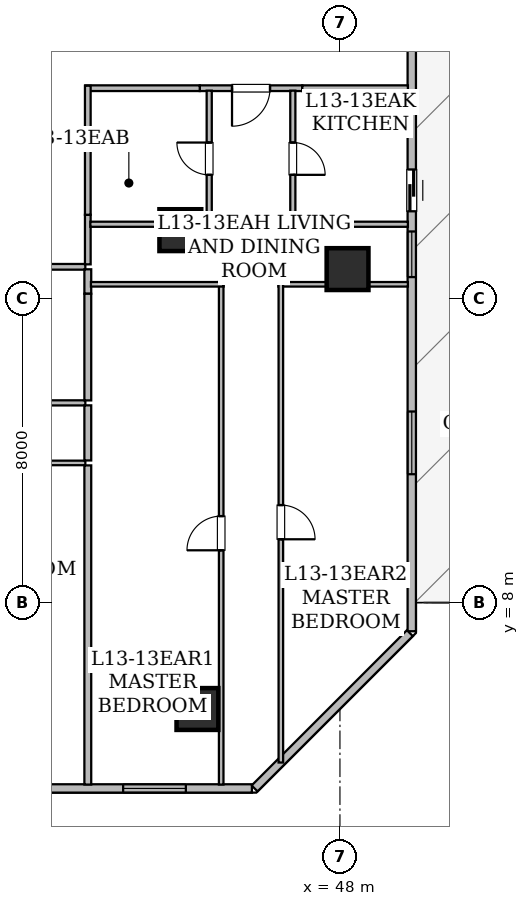
"""IFC4 building model, lengths in metres.
Left out: names, types, materials, properties, quantities, classifications, styles, units other than length and angle.
Written with IfcOpenShell. Run it as: python <this file> out.ifc"""

import sys

from ifc_helpers import new_model, si_unit, direction, frame, frame_2d, origin, origin_2d, place, context, subcontext, project, spatial, rectangle, hollow_rectangle, extrude, element, fill, save


model = new_model("IFC4")
c1 = context("Model", 3, precision=1e-05, world=origin(), true_north=direction((0.0, 1.0)))
c2 = subcontext(c1, "Body", "Model", "MODEL_VIEW")
j1 = project(units=[si_unit("LENGTHUNIT", "METRE"), si_unit("PLANEANGLEUNIT", "RADIAN")], contexts=[c1])
p1 = place(None, origin())
s1 = spatial("IfcSite", under=j1, at=p1, CompositionType="ELEMENT")
p2 = place(p1, origin())
s2 = spatial("IfcBuilding", under=s1, at=p2, CompositionType="ELEMENT")
p3 = place(p2, frame((0.0, 0.0, 55.2)))
s3 = spatial("IfcBuildingStorey", under=s2, at=p3, CompositionType="ELEMENT", Elevation=55.2)
for number, where, z_axis, x_axis in (
    (1, (44.25, 5.2, 0.0), (0.0, 0.0, 1.0), (1.0, 0.0, 0.0)),
    (2, (48.2, 16.775, 0.0), (0.0, 0.0, 1.0), (1.0, 0.0, 0.0)),
    (3, (43.8, 17.8, 0.0), (0.0, 0.0, 1.0), (1.0, 0.0, 0.0)),
):
    element("IfcColumn", number, at=place(p3, frame(where, z_axis=z_axis, x_axis=x_axis)), inside=s3, PredefinedType="COLUMN", context=c2, shape_type="SweptSolid", body=[
        extrude(hollow_rectangle(XDim=1.1, YDim=1.1, WallThickness=0.055, at=origin_2d()), origin(), (0.0, 0.0, 1.0), 3.65),
    ])
p4 = place(p3, frame((49.89, 24.707, 0.0), z_axis=(0.0, 0.0, 1.0), x_axis=(0.0, -1.0, 0.0)))
e4 = element("IfcWall", 4, at=p4, inside=s3, PredefinedType="STANDARD", context=c2, shape_type="SweptSolid", body=[
    extrude(rectangle(XDim=17.461, YDim=0.22, at=frame_2d((8.73, 0.0))), origin(), (0.0, 0.0, 1.0), 3.43),
])
p5 = place(p4, frame((5.311, 0.0, 0.0)))
e5 = element("IfcOpeningElement", 5, at=p5, cuts=e4, PredefinedType="OPENING", context=c2, shape_type="SweptSolid", body=[
    extrude(rectangle(XDim=1.1, YDim=2.2, at=frame_2d((0.55, 1.1))), frame((0.0, 0.12, 0.0), z_axis=(0.0, -1.0, 0.0), x_axis=(1.0, 0.0, 0.0)), (0.0, 0.0, 1.0), 0.24),
])
p6 = place(p4, frame((6.942, 0.0, 0.8)))
e6 = element("IfcOpeningElement", 6, at=p6, cuts=e4, PredefinedType="OPENING", context=c2, shape_type="SweptSolid", body=[
    extrude(rectangle(XDim=1.2, YDim=1.5, at=frame_2d((0.6, 0.75))), frame((0.0, 0.12, 0.0), z_axis=(0.0, -1.0, 0.0), x_axis=(1.0, 0.0, 0.0)), (0.0, 0.0, 1.0), 0.24),
])
p7 = place(p4, frame((11.679, 0.0, 0.85)))
e7 = element("IfcOpeningElement", 7, at=p7, cuts=e4, PredefinedType="OPENING", context=c2, shape_type="SweptSolid", body=[
    extrude(rectangle(XDim=1.65, YDim=1.55, at=frame_2d((0.825, 0.775))), frame((0.0, 0.12, 0.0), z_axis=(0.0, -1.0, 0.0), x_axis=(1.0, 0.0, 0.0)), (0.0, 0.0, 1.0), 0.24),
])
p8 = place(p3, frame((49.84, 7.196, 0.0), z_axis=(0.0, 0.0, 1.0), x_axis=(-0.707127905562, -0.70708565618, 0.0)))
e8 = element("IfcWall", 8, at=p8, inside=s3, PredefinedType="STANDARD", context=c2, shape_type="SweptSolid", body=[
    extrude(rectangle(XDim=5.779, YDim=0.22, at=frame_2d((2.889, 0.0))), origin(), (0.0, 0.0, 1.0), 3.43),
])
p9 = place(p3, frame((45.683, 3.11, 0.0), z_axis=(0.0, 0.0, 1.0), x_axis=(-1.0, 0.0, 0.0)))
e9 = element("IfcWall", 9, at=p9, inside=s3, PredefinedType="STANDARD", context=c2, shape_type="SweptSolid", body=[
    extrude(rectangle(XDim=37.368, YDim=0.22, at=frame_2d((18.684, 0.0))), origin(), (0.0, 0.0, 1.0), 3.43),
])
p10 = place(p9, frame((31.194, 0.0, 0.85)))
e10 = element("IfcOpeningElement", 10, at=p10, cuts=e9, PredefinedType="OPENING", context=c2, shape_type="SweptSolid", body=[
    extrude(rectangle(XDim=1.65, YDim=1.55, at=frame_2d((0.825, 0.775))), frame((0.0, 0.12, 0.0), z_axis=(0.0, -1.0, 0.0), x_axis=(1.0, 0.0, 0.0)), (0.0, 0.0, 1.0), 0.24),
])
p11 = place(p9, frame((19.615, 0.0, 0.85)))
e11 = element("IfcOpeningElement", 11, at=p11, cuts=e9, PredefinedType="OPENING", context=c2, shape_type="SweptSolid", body=[
    extrude(rectangle(XDim=1.65, YDim=1.55, at=frame_2d((0.825, 0.775))), frame((0.0, 0.12, 0.0), z_axis=(0.0, -1.0, 0.0), x_axis=(1.0, 0.0, 0.0)), (0.0, 0.0, 1.0), 0.24),
])
p12 = place(p9, frame((22.223, 0.0, 0.8)))
e12 = element("IfcOpeningElement", 12, at=p12, cuts=e9, PredefinedType="OPENING", context=c2, shape_type="SweptSolid", body=[
    extrude(rectangle(XDim=1.2, YDim=1.5, at=frame_2d((0.6, 0.75))), frame((0.0, 0.12, 0.0), z_axis=(0.0, -1.0, 0.0), x_axis=(1.0, 0.0, 0.0)), (0.0, 0.0, 1.0), 0.24),
])
p13 = place(p9, frame((25.65, 0.0, 0.85)))
e13 = element("IfcOpeningElement", 13, at=p13, cuts=e9, PredefinedType="OPENING", context=c2, shape_type="SweptSolid", body=[
    extrude(rectangle(XDim=1.65, YDim=1.55, at=frame_2d((0.825, 0.775))), frame((0.0, 0.12, 0.0), z_axis=(0.0, -1.0, 0.0), x_axis=(1.0, 0.0, 0.0)), (0.0, 0.0, 1.0), 0.24),
])
p14 = place(p9, frame((10.983, 0.0, 0.8)))
e14 = element("IfcOpeningElement", 14, at=p14, cuts=e9, PredefinedType="OPENING", context=c2, shape_type="SweptSolid", body=[
    extrude(rectangle(XDim=1.2, YDim=1.5, at=frame_2d((0.6, 0.75))), frame((0.0, 0.12, 0.0), z_axis=(0.0, -1.0, 0.0), x_axis=(1.0, 0.0, 0.0)), (0.0, 0.0, 1.0), 0.24),
])
p15 = place(p9, frame((14.783, 0.0, 0.85)))
e15 = element("IfcOpeningElement", 15, at=p15, cuts=e9, PredefinedType="OPENING", context=c2, shape_type="SweptSolid", body=[
    extrude(rectangle(XDim=1.65, YDim=1.55, at=frame_2d((0.825, 0.775))), frame((0.0, 0.12, 0.0), z_axis=(0.0, -1.0, 0.0), x_axis=(1.0, 0.0, 0.0)), (0.0, 0.0, 1.0), 0.24),
])
p16 = place(p9, frame((6.733, 0.0, 0.85)))
e16 = element("IfcOpeningElement", 16, at=p16, cuts=e9, PredefinedType="OPENING", context=c2, shape_type="SweptSolid", body=[
    extrude(rectangle(XDim=1.65, YDim=1.55, at=frame_2d((0.825, 0.775))), frame((0.0, 0.12, 0.0), z_axis=(0.0, -1.0, 0.0), x_axis=(1.0, 0.0, 0.0)), (0.0, 0.0, 1.0), 0.24),
])
p17 = place(p9, frame((1.738, 0.0, 0.85)))
e17 = element("IfcOpeningElement", 17, at=p17, cuts=e9, PredefinedType="OPENING", context=c2, shape_type="SweptSolid", body=[
    extrude(rectangle(XDim=1.65, YDim=1.55, at=frame_2d((0.825, 0.775))), frame((0.0, 0.12, 0.0), z_axis=(0.0, -1.0, 0.0), x_axis=(1.0, 0.0, 0.0)), (0.0, 0.0, 1.0), 0.24),
])
p18 = place(p3, frame((41.3, 16.835, 0.0), z_axis=(0.0, 0.0, 1.0), x_axis=(-1.0, 0.0, 0.0)))
e18 = element("IfcWall", 18, at=p18, inside=s3, PredefinedType="STANDARD", context=c2, shape_type="SweptSolid", body=[
    extrude(rectangle(XDim=7.001, YDim=0.15, at=frame_2d((3.5, 0.0))), origin(), (0.0, 0.0, 1.0), 3.43),
])
p19 = place(p3, frame((47.009, 21.535, 0.0), z_axis=(0.0, 0.0, 1.0), x_axis=(-1.0, 0.0, 0.0)))
e19 = element("IfcWall", 19, at=p19, inside=s3, PredefinedType="STANDARD", context=c2, shape_type="SweptSolid", body=[
    extrude(rectangle(XDim=2.698, YDim=0.15, at=frame_2d((1.349, 0.0))), origin(), (0.0, 0.0, 1.0), 3.43),
])
p20 = place(p19, frame((0.849, 0.0, 0.0)))
e20 = element("IfcOpeningElement", 20, at=p20, cuts=e19, PredefinedType="OPENING", context=c2, shape_type="SweptSolid", body=[
    extrude(rectangle(XDim=1.0, YDim=2.15, at=frame_2d((0.5, 1.075))), frame((0.0, 0.085, 0.0), z_axis=(0.0, -1.0, 0.0), x_axis=(1.0, 0.0, 0.0)), (0.0, 0.0, 1.0), 0.17),
])
p21 = place(p3, frame((41.365, 18.204, 0.0), z_axis=(0.0, 0.0, 1.0), x_axis=(0.0, -1.0, 0.0)))
e21 = element("IfcWall", 21, at=p21, inside=s3, PredefinedType="STANDARD", context=c2, shape_type="SweptSolid", body=[
    extrude(rectangle(XDim=1.304, YDim=0.15, at=frame_2d((0.652, 0.0))), origin(), (0.0, 0.0, 1.0), 3.43),
])
p22 = place(p3, frame((44.311, 21.535, 0.0), z_axis=(0.0, 0.0, 1.0), x_axis=(-1.0, 0.0, 0.0)))
e22 = element("IfcWall", 22, at=p22, inside=s3, PredefinedType="STANDARD", context=c2, shape_type="SweptSolid", body=[
    extrude(rectangle(XDim=3.011, YDim=0.15, at=frame_2d((1.505, 0.0))), origin(), (0.0, 0.0, 1.0), 2.647),
])
p23 = place(p3, frame((41.365, 21.6, 0.0), z_axis=(0.0, 0.0, 1.0), x_axis=(0.0, -1.0, 0.0)))
e23 = element("IfcWall", 23, at=p23, inside=s3, PredefinedType="STANDARD", context=c2, shape_type="SweptSolid", body=[
    extrude(rectangle(XDim=3.396, YDim=0.15, at=frame_2d((1.698, 0.0))), origin(), (0.0, 0.0, 1.0), 2.647),
])
p24 = place(p3, frame((49.788, 21.535, 0.0), z_axis=(0.0, 0.0, 1.0), x_axis=(-1.0, 0.0, 0.0)))
e24 = element("IfcWall", 24, at=p24, inside=s3, PredefinedType="STANDARD", context=c2, shape_type="SweptSolid", body=[
    extrude(rectangle(XDim=2.779, YDim=0.15, at=frame_2d((1.39, 0.0))), origin(), (0.0, 0.0, 1.0), 2.803),
])
p25 = place(p3, frame((33.985, 13.255, 0.0), z_axis=(0.0, 0.0, 1.0), x_axis=(1.0, 0.0, 0.0)))
e25 = element("IfcWall", 25, at=p25, inside=s3, PredefinedType="PARTITIONING", context=c2, shape_type="SweptSolid", body=[
    extrude(rectangle(XDim=7.315, YDim=0.135, at=frame_2d((3.657, 0.0))), origin(), (0.0, 0.0, 1.0), 3.43),
])
p26 = place(p25, frame((3.233, 0.0, 0.0)))
e26 = element("IfcOpeningElement", 26, at=p26, cuts=e25, PredefinedType="OPENING", context=c2, shape_type="SweptSolid", body=[
    extrude(rectangle(XDim=0.85, YDim=2.1, at=frame_2d((0.425, 1.05))), frame((0.0, 0.077, 0.0), z_axis=(0.0, -1.0, 0.0), x_axis=(1.0, 0.0, 0.0)), (0.0, 0.0, 1.0), 0.155),
])
p27 = place(p3, frame((41.3, 11.675, 0.0), z_axis=(0.0, 0.0, 1.0), x_axis=(-1.0, 0.0, 0.0)))
e27 = element("IfcWall", 27, at=p27, inside=s3, PredefinedType="PARTITIONING", context=c2, shape_type="SweptSolid", body=[
    extrude(rectangle(XDim=6.48, YDim=0.12, at=frame_2d((3.24, 0.0))), origin(), (0.0, 0.0, 1.0), 3.43),
])
p28 = place(p3, frame((41.365, 13.19, 0.0), z_axis=(0.0, 0.0, 1.0), x_axis=(0.0, -1.0, 0.0)))
e28 = element("IfcWall", 28, at=p28, inside=s3, PredefinedType="STANDARD", context=c2, shape_type="SweptSolid", body=[
    extrude(rectangle(XDim=1.45, YDim=0.18, at=frame_2d((0.725, 0.0))), origin(), (0.0, 0.0, 1.0), 3.43),
])
p29 = place(p3, frame((41.365, 16.77, 0.0), z_axis=(0.0, 0.0, 1.0), x_axis=(0.0, -1.0, 0.0)))
e29 = element("IfcWall", 29, at=p29, inside=s3, PredefinedType="STANDARD", context=c2, shape_type="SweptSolid", body=[
    extrude(rectangle(XDim=0.644, YDim=0.18, at=frame_2d((0.322, 0.0))), origin(), (0.0, 0.0, 1.0), 3.43),
])
p30 = place(p3, frame((41.365, 16.126, 0.0), z_axis=(0.0, 0.0, 1.0), x_axis=(0.0, -1.0, 0.0)))
e30 = element("IfcWall", 30, at=p30, inside=s3, PredefinedType="STANDARD", context=c2, shape_type="SweptSolid", body=[
    extrude(rectangle(XDim=2.806, YDim=0.18, at=frame_2d((1.403, 0.0))), origin(), (0.0, 0.0, 1.0), 3.43),
])
p31 = place(p3, frame((41.365, 11.61, 0.0), z_axis=(0.0, 0.0, 1.0), x_axis=(0.0, -1.0, 0.0)))
e31 = element("IfcWall", 31, at=p31, inside=s3, PredefinedType="STANDARD", context=c2, shape_type="SweptSolid", body=[
    extrude(rectangle(XDim=8.398, YDim=0.18, at=frame_2d((4.199, 0.0))), origin(), (0.0, 0.0, 1.0), 2.803),
])
p32 = place(p3, frame((41.432, 17.955, 0.0), z_axis=(0.0, 0.0, 1.0), x_axis=(1.0, 0.0, 0.0)))
e32 = element("IfcWall", 32, at=p32, inside=s3, PredefinedType="PARTITIONING", context=c2, shape_type="SweptSolid", body=[
    extrude(rectangle(XDim=3.193, YDim=0.135, at=frame_2d((1.597, 0.0))), origin(), (0.0, 0.0, 1.0), 2.647),
])
p33 = place(p3, frame((44.56, 17.89, 0.0), z_axis=(0.0, 0.0, 1.0), x_axis=(0.0, 1.0, 0.0)))
e33 = element("IfcWall", 33, at=p33, inside=s3, PredefinedType="PARTITIONING", context=c2, shape_type="SweptSolid", body=[
    extrude(rectangle(XDim=3.58, YDim=0.135, at=frame_2d((1.79, 0.0))), origin(), (0.0, 0.0, 1.0), 3.43),
])
p34 = place(p33, frame((1.365, 0.0, 0.0)))
e34 = element("IfcOpeningElement", 34, at=p34, cuts=e33, PredefinedType="OPENING", context=c2, shape_type="SweptSolid", body=[
    extrude(rectangle(XDim=0.85, YDim=2.1, at=frame_2d((0.425, 1.05))), frame((0.0, 0.077, 0.0), z_axis=(0.0, -1.0, 0.0), x_axis=(1.0, 0.0, 0.0)), (0.0, 0.0, 1.0), 0.155),
])
p35 = place(p3, frame((46.76, 21.47, 0.0), z_axis=(0.0, 0.0, 1.0), x_axis=(0.0, -1.0, 0.0)))
e35 = element("IfcWall", 35, at=p35, inside=s3, PredefinedType="PARTITIONING", context=c2, shape_type="SweptSolid", body=[
    extrude(rectangle(XDim=3.58, YDim=0.135, at=frame_2d((1.79, 0.0))), origin(), (0.0, 0.0, 1.0), 3.43),
])
p36 = place(p35, frame((1.365, 0.0, 0.0)))
e36 = element("IfcOpeningElement", 36, at=p36, cuts=e35, PredefinedType="OPENING", context=c2, shape_type="SweptSolid", body=[
    extrude(rectangle(XDim=0.85, YDim=2.1, at=frame_2d((0.425, 1.05))), frame((0.0, 0.077, 0.0), z_axis=(0.0, -1.0, 0.0), x_axis=(1.0, 0.0, 0.0)), (0.0, 0.0, 1.0), 0.155),
])
p37 = place(p3, frame((46.695, 17.955, 0.0), z_axis=(0.0, 0.0, 1.0), x_axis=(1.0, 0.0, 0.0)))
e37 = element("IfcWall", 37, at=p37, inside=s3, PredefinedType="PARTITIONING", context=c2, shape_type="SweptSolid", body=[
    extrude(rectangle(XDim=3.093, YDim=0.135, at=frame_2d((1.546, 0.0))), origin(), (0.0, 0.0, 1.0), 2.803),
])
p38 = place(p3, frame((44.875, 3.212, 0.0), z_axis=(0.0, 0.0, 1.0), x_axis=(0.0, 1.0, 0.0)))
e38 = element("IfcWall", 38, at=p38, inside=s3, PredefinedType="PARTITIONING", context=c2, shape_type="SweptSolid", body=[
    extrude(rectangle(XDim=13.228, YDim=0.12, at=frame_2d((6.614, 0.0))), origin(), (0.0, 0.0, 1.0), 2.803),
])
p39 = place(p38, frame((6.164, 0.0, 0.0)))
e39 = element("IfcOpeningElement", 39, at=p39, cuts=e38, PredefinedType="OPENING", context=c2, shape_type="SweptSolid", body=[
    extrude(rectangle(XDim=0.9, YDim=2.1, at=frame_2d((0.45, 1.05))), frame((0.0, 0.07, 0.0), z_axis=(0.0, -1.0, 0.0), x_axis=(1.0, 0.0, 0.0)), (0.0, 0.0, 1.0), 0.14),
])
p40 = place(p3, frame((44.94, 16.375, 0.0), z_axis=(0.0, 0.0, 1.0), x_axis=(-1.0, 0.0, 0.0)))
e40 = element("IfcWall", 40, at=p40, inside=s3, PredefinedType="PARTITIONING", context=c2, shape_type="SweptSolid", body=[
    extrude(rectangle(XDim=3.493, YDim=0.12, at=frame_2d((1.747, 0.0))), origin(), (0.0, 0.0, 1.0), 2.647),
])
p41 = place(p3, frame((49.788, 16.375, 0.0), z_axis=(0.0, 0.0, 1.0), x_axis=(-1.0, 0.0, 0.0)))
e41 = element("IfcWall", 41, at=p41, inside=s3, PredefinedType="PARTITIONING", context=c2, shape_type="SweptSolid", body=[
    extrude(rectangle(XDim=3.408, YDim=0.12, at=frame_2d((1.704, 0.0))), origin(), (0.0, 0.0, 1.0), 2.803),
])
p42 = place(p3, frame((46.445, 16.44, 0.0), z_axis=(0.0, 0.0, 1.0), x_axis=(0.0, -1.0, 0.0)))
e42 = element("IfcWall", 42, at=p42, inside=s3, PredefinedType="PARTITIONING", context=c2, shape_type="SweptSolid", body=[
    extrude(rectangle(XDim=12.648, YDim=0.12, at=frame_2d((6.324, 0.0))), origin(), (0.0, 0.0, 1.0), 2.803),
])
p43 = place(p42, frame((5.874, 0.0, 0.0)))
e43 = element("IfcOpeningElement", 43, at=p43, cuts=e42, PredefinedType="OPENING", context=c2, shape_type="SweptSolid", body=[
    extrude(rectangle(XDim=0.9, YDim=2.1, at=frame_2d((0.45, 1.05))), frame((0.0, 0.07, 0.0), z_axis=(0.0, -1.0, 0.0), x_axis=(1.0, 0.0, 0.0)), (0.0, 0.0, 1.0), 0.14),
])
p44 = place(p5, origin())
e44 = element("IfcDoor", 44, at=p44, inside=s3, OperationType="SLIDING_TO_LEFT", PredefinedType="DOOR", context=c2, shape_type="SweptSolid", body=[
    extrude(rectangle(XDim=1.1, YDim=2.2, at=frame_2d((0.55, 1.1))), frame((0.0, 0.025, 0.0), z_axis=(0.0, -1.0, 0.0), x_axis=(1.0, 0.0, 0.0)), (0.0, 0.0, 1.0), 0.05),
])
fill(e5, e44)
p45 = place(p6, origin())
e45 = element("IfcWindow", 45, at=p45, inside=s3, PartitioningType="SINGLE_PANEL", PredefinedType="WINDOW", context=c2, shape_type="SweptSolid", body=[
    extrude(rectangle(XDim=1.2, YDim=1.5, at=frame_2d((0.6, 0.75))), frame((0.0, 0.03, 0.0), z_axis=(0.0, -1.0, 0.0), x_axis=(1.0, 0.0, 0.0)), (0.0, 0.0, 1.0), 0.06),
])
fill(e6, e45)
p46 = place(p17, origin())
e46 = element("IfcWindow", 46, at=p46, inside=s3, PartitioningType="SINGLE_PANEL", PredefinedType="WINDOW", context=c2, shape_type="SweptSolid", body=[
    extrude(rectangle(XDim=1.65, YDim=1.55, at=frame_2d((0.825, 0.775))), frame((0.0, 0.03, 0.0), z_axis=(0.0, -1.0, 0.0), x_axis=(1.0, 0.0, 0.0)), (0.0, 0.0, 1.0), 0.06),
])
fill(e17, e46)
p47 = place(p7, origin())
e47 = element("IfcWindow", 47, at=p47, inside=s3, PartitioningType="SINGLE_PANEL", PredefinedType="WINDOW", context=c2, shape_type="SweptSolid", body=[
    extrude(rectangle(XDim=1.65, YDim=1.55, at=frame_2d((0.825, 0.775))), frame((0.0, 0.03, 0.0), z_axis=(0.0, -1.0, 0.0), x_axis=(1.0, 0.0, 0.0)), (0.0, 0.0, 1.0), 0.06),
])
fill(e7, e47)
p48 = place(p20, origin())
e48 = element("IfcDoor", 48, at=p48, inside=s3, OperationType="SINGLE_SWING_RIGHT", PredefinedType="DOOR", context=c2, shape_type="SweptSolid", body=[
    extrude(rectangle(XDim=1.0, YDim=2.15, at=frame_2d((0.5, 1.075))), frame((0.0, 0.025, 0.0), z_axis=(0.0, -1.0, 0.0), x_axis=(1.0, 0.0, 0.0)), (0.0, 0.0, 1.0), 0.05),
])
fill(e20, e48)
p49 = place(p34, origin())
e49 = element("IfcDoor", 49, at=p49, inside=s3, OperationType="SINGLE_SWING_RIGHT", PredefinedType="DOOR", context=c2, shape_type="SweptSolid", body=[
    extrude(rectangle(XDim=0.85, YDim=2.1, at=frame_2d((0.425, 1.05))), frame((0.0, 0.025, 0.0), z_axis=(0.0, -1.0, 0.0), x_axis=(1.0, 0.0, 0.0)), (0.0, 0.0, 1.0), 0.05),
])
fill(e34, e49)
p50 = place(p36, origin())
e50 = element("IfcDoor", 50, at=p50, inside=s3, OperationType="SINGLE_SWING_RIGHT", PredefinedType="DOOR", context=c2, shape_type="SweptSolid", body=[
    extrude(rectangle(XDim=0.85, YDim=2.1, at=frame_2d((0.425, 1.05))), frame((0.0, 0.025, 0.0), z_axis=(0.0, -1.0, 0.0), x_axis=(1.0, 0.0, 0.0)), (0.0, 0.0, 1.0), 0.05),
])
fill(e36, e50)
p51 = place(p39, origin())
e51 = element("IfcDoor", 51, at=p51, inside=s3, OperationType="SINGLE_SWING_LEFT", PredefinedType="DOOR", context=c2, shape_type="SweptSolid", body=[
    extrude(rectangle(XDim=0.9, YDim=2.1, at=frame_2d((0.45, 1.05))), frame((0.0, 0.025, 0.0), z_axis=(0.0, -1.0, 0.0), x_axis=(1.0, 0.0, 0.0)), (0.0, 0.0, 1.0), 0.05),
])
fill(e39, e51)
p52 = place(p43, origin())
e52 = element("IfcDoor", 52, at=p52, inside=s3, OperationType="SINGLE_SWING_RIGHT", PredefinedType="DOOR", context=c2, shape_type="SweptSolid", body=[
    extrude(rectangle(XDim=0.9, YDim=2.1, at=frame_2d((0.45, 1.05))), frame((0.0, 0.025, 0.0), z_axis=(0.0, -1.0, 0.0), x_axis=(1.0, 0.0, 0.0)), (0.0, 0.0, 1.0), 0.05),
])
fill(e43, e52)
save(model, sys.argv[1])
